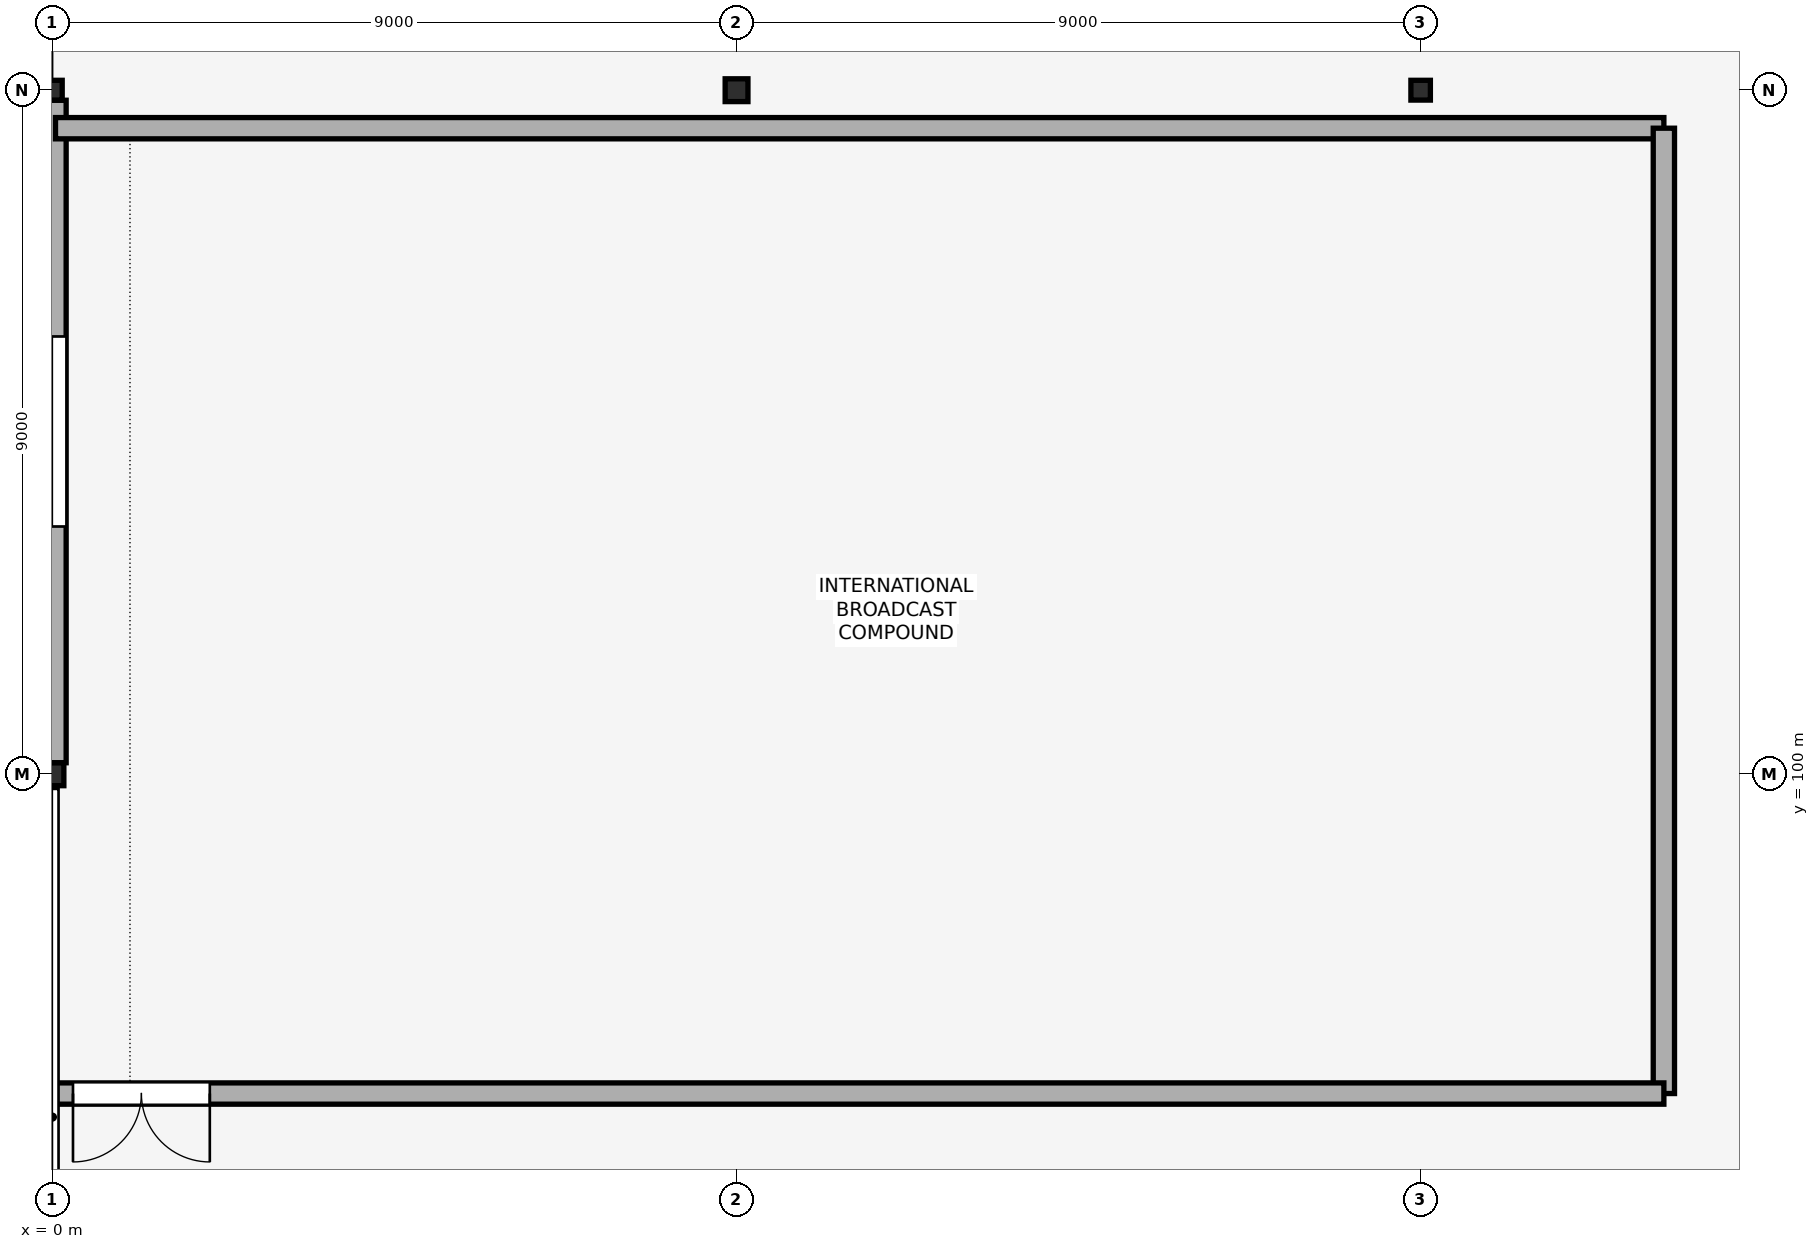
"""IFC4 building model, lengths in metres.
Left out: names, types, materials, properties, quantities, classifications, styles, units other than length and angle.
Written with IfcOpenShell. Run it as: python <this file> out.ifc"""

import sys

from ifc_helpers import new_model, si_unit, direction, frame, frame_2d, origin, origin_2d, place, context, subcontext, project, spatial, rectangle, hollow_rectangle, i_section, extrude, element, fill, save


model = new_model("IFC4")
c1 = context("Model", 3, precision=1e-05, world=origin(), true_north=direction((0.0, 1.0)))
c2 = subcontext(c1, "Body", "Model", "MODEL_VIEW")
j1 = project(units=[si_unit("LENGTHUNIT", "METRE"), si_unit("PLANEANGLEUNIT", "RADIAN")], contexts=[c1])
p1 = place(None, origin())
s1 = spatial("IfcSite", under=j1, at=p1, CompositionType="ELEMENT")
p2 = place(p1, origin())
s2 = spatial("IfcBuilding", under=s1, at=p2, CompositionType="ELEMENT")
p3 = place(p2, frame((0.0, 0.0, 15.0)))
s3 = spatial("IfcBuildingStorey", under=s2, at=p3, CompositionType="ELEMENT", Elevation=15.0)
p4 = place(p3, frame((0.0, 100.0, 0.0), z_axis=(0.0, 0.0, 1.0), x_axis=(1.0, 0.0, 0.0)))
e1 = element("IfcColumn", 1, at=p4, inside=s3, PredefinedType="COLUMN", context=c2, shape_type="SweptSolid", body=[
    extrude(hollow_rectangle(XDim=0.3, YDim=0.3, WallThickness=0.012, at=origin_2d()), origin(), (0.0, 0.0, 1.0), 4.5),
])
p5 = place(p3, frame((0.0, 109.0, 0.0), z_axis=(0.0, 0.0, 1.0), x_axis=(1.0, 0.0, 0.0)))
e2 = element("IfcColumn", 2, at=p5, inside=s3, PredefinedType="COLUMN", context=c2, shape_type="SweptSolid", body=[
    extrude(i_section(OverallWidth=0.256, OverallDepth=0.26, WebThickness=0.01, FlangeThickness=0.017, FilletRadius=0.013, at=origin_2d()), origin(), (0.0, 0.0, 1.0), 4.5),
])
p6 = place(p3, frame((9.0, 109.0, 0.0), z_axis=(0.0, 0.0, 1.0), x_axis=(1.0, 0.0, 0.0)))
e3 = element("IfcColumn", 3, at=p6, inside=s3, PredefinedType="COLUMN", context=c2, shape_type="SweptSolid", body=[
    extrude(hollow_rectangle(XDim=0.3, YDim=0.3, WallThickness=0.012, at=origin_2d()), origin(), (0.0, 0.0, 1.0), 4.5),
])
p7 = place(p3, frame((18.0, 109.0, 0.0), z_axis=(0.0, 0.0, 1.0), x_axis=(1.0, 0.0, 0.0)))
e4 = element("IfcColumn", 4, at=p7, inside=s3, PredefinedType="COLUMN", context=c2, shape_type="SweptSolid", body=[
    extrude(i_section(OverallWidth=0.256, OverallDepth=0.26, WebThickness=0.01, FlangeThickness=0.017, FilletRadius=0.013, at=origin_2d()), origin(), (0.0, 0.0, 1.0), 4.5),
])
p8 = place(p3, frame((0.0, 100.152, 0.0), z_axis=(0.0, 0.0, 1.0), x_axis=(0.0, 1.0, 0.0)))
e5 = element("IfcWall", 5, at=p8, inside=s3, PredefinedType="STANDARD", context=c2, shape_type="SweptSolid", body=[
    extrude(rectangle(XDim=8.716, YDim=0.36, at=frame_2d((4.358, 0.0))), origin(), (0.0, 0.0, 1.0), 3.945),
])
p9 = place(p8, frame((3.108, 0.0, 0.85)))
e6 = element("IfcOpeningElement", 6, at=p9, cuts=e5, PredefinedType="OPENING", context=c2, shape_type="SweptSolid", body=[
    extrude(rectangle(XDim=2.5, YDim=1.7, at=frame_2d((1.25, 0.85))), frame((0.0, 0.19, 0.0), z_axis=(0.0, -1.0, 0.0), x_axis=(1.0, 0.0, 0.0)), (0.0, 0.0, 1.0), 0.38),
])
p10 = place(p3, frame((0.04, 108.5, 0.0), z_axis=(0.0, 0.0, 1.0), x_axis=(1.0, 0.0, 0.0)))
e7 = element("IfcWall", 7, at=p10, inside=s3, PredefinedType="PARTITIONING", context=c2, shape_type="SweptSolid", body=[
    extrude(rectangle(XDim=21.16, YDim=0.28, at=frame_2d((10.58, 0.0))), origin(), (0.0, 0.0, 1.0), 4.25),
])
p11 = place(p3, frame((21.2, 108.5, 0.0), z_axis=(0.0, 0.0, 1.0), x_axis=(0.0, -1.0, 0.0)))
e8 = element("IfcWall", 8, at=p11, inside=s3, PredefinedType="PARTITIONING", context=c2, shape_type="SweptSolid", body=[
    extrude(rectangle(XDim=12.7, YDim=0.28, at=frame_2d((6.35, 0.0))), origin(), (0.0, 0.0, 1.0), 4.25),
])
p12 = place(p3, frame((21.2, 95.8, 0.0), z_axis=(0.0, 0.0, 1.0), x_axis=(-1.0, 0.0, 0.0)))
e9 = element("IfcWall", 9, at=p12, inside=s3, PredefinedType="PARTITIONING", context=c2, shape_type="SweptSolid", body=[
    extrude(rectangle(XDim=21.18, YDim=0.28, at=frame_2d((10.59, 0.0))), origin(), (0.0, 0.0, 1.0), 4.25),
])
p13 = place(p12, frame((19.13, 0.0, 0.0)))
e10 = element("IfcOpeningElement", 10, at=p13, cuts=e9, PredefinedType="OPENING", context=c2, shape_type="SweptSolid", body=[
    extrude(rectangle(XDim=1.8, YDim=2.2, at=frame_2d((0.9, 1.1))), frame((0.0, 0.15, 0.0), z_axis=(0.0, -1.0, 0.0), x_axis=(1.0, 0.0, 0.0)), (0.0, 0.0, 1.0), 0.3),
])
p14 = place(p9, origin())
e11 = element("IfcWindow", 11, at=p14, inside=s3, PartitioningType="SINGLE_PANEL", PredefinedType="WINDOW", context=c2, shape_type="SweptSolid", body=[
    extrude(rectangle(XDim=2.5, YDim=1.7, at=frame_2d((1.25, 0.85))), frame((0.0, 0.03, 0.0), z_axis=(0.0, -1.0, 0.0), x_axis=(1.0, 0.0, 0.0)), (0.0, 0.0, 1.0), 0.06),
])
fill(e6, e11)
p15 = place(p13, origin())
e12 = element("IfcDoor", 12, at=p15, inside=s3, OperationType="DOUBLE_DOOR_SINGLE_SWING", PredefinedType="DOOR", context=c2, shape_type="SweptSolid", body=[
    extrude(rectangle(XDim=1.8, YDim=2.2, at=frame_2d((0.9, 1.1))), frame((0.0, 0.025, 0.0), z_axis=(0.0, -1.0, 0.0), x_axis=(1.0, 0.0, 0.0)), (0.0, 0.0, 1.0), 0.05),
])
fill(e10, e12)
save(model, sys.argv[1])
